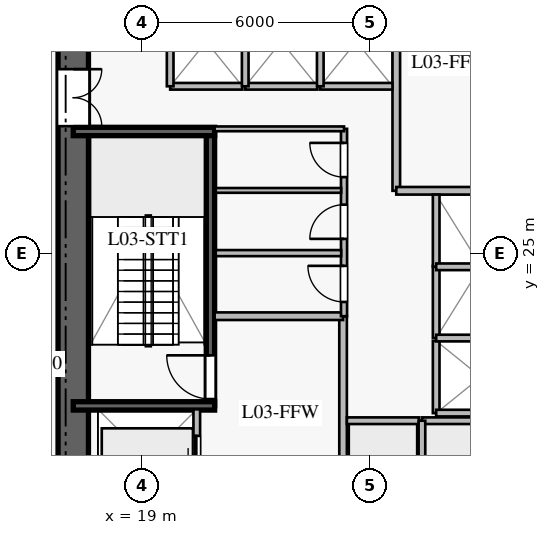
"""IFC4 building model, lengths in metres.
Left out: names, types, materials, properties, quantities, classifications, styles, units other than length and angle.
Written with IfcOpenShell. Run it as: python <this file> out.ifc"""

import sys

from ifc_helpers import new_model, si_unit, direction, frame, frame_2d, origin, place, context, subcontext, project, spatial, rectangle, extrude, element, fill, save


model = new_model("IFC4")
c1 = context("Model", 3, precision=1e-05, world=origin(), true_north=direction((0.0, 1.0)))
c2 = subcontext(c1, "Body", "Model", "MODEL_VIEW")
j1 = project(units=[si_unit("LENGTHUNIT", "METRE"), si_unit("PLANEANGLEUNIT", "RADIAN")], contexts=[c1])
p1 = place(None, origin())
s1 = spatial("IfcSite", under=j1, at=p1, CompositionType="ELEMENT")
p2 = place(p1, origin())
s2 = spatial("IfcBuilding", under=s1, at=p2, CompositionType="ELEMENT")
p3 = place(p2, frame((0.0, 0.0, 14.4)))
s3 = spatial("IfcBuildingStorey", under=s2, at=p3, CompositionType="ELEMENT", Elevation=14.4)
p4 = place(p3, frame((17.2, 31.8, 0.0), z_axis=(0.0, 0.0, 1.0), x_axis=(0.0, -1.0, 0.0)))
e1 = element("IfcWall", 1, at=p4, inside=s3, PredefinedType="SHEAR", context=c2, shape_type="SweptSolid", body=[
    extrude(rectangle(XDim=13.6, YDim=0.8, at=frame_2d((6.8, 0.0))), origin(), (0.0, 0.0, 1.0), 4.3),
])
p5 = place(p4, frame((1.95, 0.0, 0.0)))
e2 = element("IfcOpeningElement", 2, at=p5, cuts=e1, PredefinedType="OPENING", context=c2, shape_type="SweptSolid", body=[
    extrude(rectangle(XDim=1.5, YDim=2.2, at=frame_2d((0.75, 1.1))), frame((0.0, 0.41, 0.0), z_axis=(0.0, -1.0, 0.0), x_axis=(1.0, 0.0, 0.0)), (0.0, 0.0, 1.0), 0.82),
])
p6 = place(p3, frame((20.81, 20.99, 0.0), z_axis=(0.0, 0.0, 1.0), x_axis=(0.0, 1.0, 0.0)))
e3 = element("IfcWall", 3, at=p6, inside=s3, PredefinedType="SOLIDWALL", context=c2, shape_type="SweptSolid", body=[
    extrude(rectangle(XDim=7.22, YDim=0.22, at=frame_2d((3.61, 0.0))), origin(), (0.0, 0.0, 1.0), 4.3),
])
p7 = place(p6, frame((0.18, 0.0, 0.0)))
e4 = element("IfcOpeningElement", 4, at=p7, cuts=e3, PredefinedType="OPENING", context=c2, shape_type="SweptSolid", body=[
    extrude(rectangle(XDim=1.15, YDim=2.2, at=frame_2d((0.575, 1.1))), frame((0.0, 0.12, 0.0), z_axis=(0.0, -1.0, 0.0), x_axis=(1.0, 0.0, 0.0)), (0.0, 0.0, 1.0), 0.24),
])
for number, where, z_axis, x_axis in (
    (5, (17.2, 20.99, 0.0), (0.0, 0.0, 1.0), (1.0, 0.0, 0.0)),
    (6, (17.2, 28.21, 0.0), (0.0, 0.0, 1.0), (1.0, 0.0, 0.0)),
):
    element("IfcWall", number, at=place(p3, frame(where, z_axis=z_axis, x_axis=x_axis)), inside=s3, PredefinedType="SOLIDWALL", context=c2, shape_type="SweptSolid", body=[
        extrude(rectangle(XDim=3.72, YDim=0.22, at=frame_2d((1.86, 0.0))), origin(), (0.0, 0.0, 1.0), 4.3),
    ])
p8 = place(p3, frame((24.3, 18.2, 0.0), z_axis=(0.0, 0.0, 1.0), x_axis=(0.0, 1.0, 0.0)))
e7 = element("IfcWall", 7, at=p8, inside=s3, PredefinedType="PARTITIONING", context=c2, shape_type="SweptSolid", body=[
    extrude(rectangle(XDim=5.15, YDim=0.2, at=frame_2d((2.575, 0.0))), origin(), (0.0, 0.0, 1.0), 4.3),
])
p9 = place(p3, frame((20.92, 23.35, 0.0), z_axis=(0.0, 0.0, 1.0), x_axis=(1.0, 0.0, 0.0)))
e8 = element("IfcWall", 8, at=p9, inside=s3, PredefinedType="PARTITIONING", context=c2, shape_type="SweptSolid", body=[
    extrude(rectangle(XDim=3.38, YDim=0.2, at=frame_2d((1.69, 0.0))), origin(), (0.0, 0.0, 1.0), 4.3),
])
p10 = place(p3, frame((25.7, 26.65, 0.0), z_axis=(0.0, 0.0, 1.0), x_axis=(0.0, 1.0, 0.0)))
e9 = element("IfcWall", 9, at=p10, inside=s3, PredefinedType="PARTITIONING", context=c2, shape_type="SweptSolid", body=[
    extrude(rectangle(XDim=5.15, YDim=0.2, at=frame_2d((2.575, 0.0))), origin(), (0.0, 0.0, 1.0), 4.3),
])
p11 = place(p3, frame((25.7, 26.65, 0.0), z_axis=(0.0, 0.0, 1.0), x_axis=(1.0, 0.0, 0.0)))
e10 = element("IfcWall", 10, at=p11, inside=s3, PredefinedType="PARTITIONING", context=c2, shape_type="SweptSolid", body=[
    extrude(rectangle(XDim=3.38, YDim=0.2, at=frame_2d((1.69, 0.0))), origin(), (0.0, 0.0, 1.0), 4.3),
])
p12 = place(p3, frame((24.325, 23.35, 0.0), z_axis=(0.0, 0.0, 1.0), x_axis=(0.0, 1.0, 0.0)))
e11 = element("IfcWall", 11, at=p12, inside=s3, PredefinedType="PLUMBINGWALL", context=c2, shape_type="SweptSolid", body=[
    extrude(rectangle(XDim=4.93, YDim=0.16, at=frame_2d((2.465, 0.0))), origin(), (0.0, 0.0, 1.0), 4.3),
])
p13 = place(p12, frame((0.375, 0.0, 0.0)))
e12 = element("IfcOpeningElement", 12, at=p13, cuts=e11, PredefinedType="OPENING", context=c2, shape_type="SweptSolid", body=[
    extrude(rectangle(XDim=0.95, YDim=2.1, at=frame_2d((0.475, 1.05))), frame((0.0, 0.09, 0.0), z_axis=(0.0, -1.0, 0.0), x_axis=(1.0, 0.0, 0.0)), (0.0, 0.0, 1.0), 0.18),
])
p14 = place(p12, frame((2.035, 0.0, 0.0)))
e13 = element("IfcOpeningElement", 13, at=p14, cuts=e11, PredefinedType="OPENING", context=c2, shape_type="SweptSolid", body=[
    extrude(rectangle(XDim=0.9, YDim=2.1, at=frame_2d((0.45, 1.05))), frame((0.0, 0.09, 0.0), z_axis=(0.0, -1.0, 0.0), x_axis=(1.0, 0.0, 0.0)), (0.0, 0.0, 1.0), 0.18),
])
p15 = place(p12, frame((3.66, 0.0, 0.0)))
e14 = element("IfcOpeningElement", 14, at=p15, cuts=e11, PredefinedType="OPENING", context=c2, shape_type="SweptSolid", body=[
    extrude(rectangle(XDim=0.9, YDim=2.1, at=frame_2d((0.45, 1.05))), frame((0.0, 0.09, 0.0), z_axis=(0.0, -1.0, 0.0), x_axis=(1.0, 0.0, 0.0)), (0.0, 0.0, 1.0), 0.18),
])
p16 = place(p3, frame((20.92, 28.28, 0.0), z_axis=(0.0, 0.0, 1.0), x_axis=(1.0, 0.0, 0.0)))
e15 = element("IfcWall", 15, at=p16, inside=s3, PredefinedType="PARTITIONING", context=c2, shape_type="SweptSolid", body=[
    extrude(rectangle(XDim=3.405, YDim=0.125, at=frame_2d((1.703, 0.0))), origin(), (0.0, 0.0, 1.0), 4.3),
])
p17 = place(p3, frame((20.95, 25.01, 0.0), z_axis=(0.0, 0.0, 1.0), x_axis=(1.0, 0.0, 0.0)))
e16 = element("IfcWall", 16, at=p17, inside=s3, PredefinedType="PLUMBINGWALL", context=c2, shape_type="SweptSolid", body=[
    extrude(rectangle(XDim=3.3, YDim=0.16, at=frame_2d((1.65, 0.0))), origin(), (0.0, 0.0, 1.0), 4.3),
])
p18 = place(p3, frame((20.95, 26.66, 0.0), z_axis=(0.0, 0.0, 1.0), x_axis=(1.0, 0.0, 0.0)))
e17 = element("IfcWall", 17, at=p18, inside=s3, PredefinedType="PARTITIONING", context=c2, shape_type="SweptSolid", body=[
    extrude(rectangle(XDim=3.3, YDim=0.125, at=frame_2d((1.65, 0.0))), origin(), (0.0, 0.0, 1.0), 4.3),
])
p19 = place(p3, frame((24.4, 20.6, 0.0), z_axis=(0.0, 0.0, 1.0), x_axis=(1.0, 0.0, 0.0)))
e18 = element("IfcWall", 18, at=p19, inside=s3, PredefinedType="PARTITIONING", context=c2, shape_type="SweptSolid", body=[
    extrude(rectangle(XDim=1.9, YDim=0.175, at=frame_2d((0.95, 0.0))), origin(), (0.0, 0.0, 1.0), 4.3),
])
p20 = place(p3, frame((26.375, 20.6, 0.0), z_axis=(0.0, 0.0, 1.0), x_axis=(1.0, 0.0, 0.0)))
e19 = element("IfcWall", 19, at=p20, inside=s3, PredefinedType="PARTITIONING", context=c2, shape_type="SweptSolid", body=[
    extrude(rectangle(XDim=1.9, YDim=0.175, at=frame_2d((0.95, 0.0))), origin(), (0.0, 0.0, 1.0), 4.3),
])
p21 = place(p3, frame((26.375, 18.25, 0.0), z_axis=(0.0, 0.0, 1.0), x_axis=(0.0, 1.0, 0.0)))
e20 = element("IfcWall", 20, at=p21, inside=s3, PredefinedType="PARTITIONING", context=c2, shape_type="SweptSolid", body=[
    extrude(rectangle(XDim=2.35, YDim=0.175, at=frame_2d((1.175, 0.0))), origin(), (0.0, 0.0, 1.0), 4.3),
])
p22 = place(p3, frame((19.75, 29.4, 0.0), z_axis=(0.0, 0.0, 1.0), x_axis=(1.0, 0.0, 0.0)))
e21 = element("IfcWall", 21, at=p22, inside=s3, PredefinedType="PARTITIONING", context=c2, shape_type="SweptSolid", body=[
    extrude(rectangle(XDim=1.9, YDim=0.175, at=frame_2d((0.95, 0.0))), origin(), (0.0, 0.0, 1.0), 4.3),
])
p23 = place(p3, frame((19.75, 29.4, 0.0), z_axis=(0.0, 0.0, 1.0), x_axis=(0.0, 1.0, 0.0)))
e22 = element("IfcWall", 22, at=p23, inside=s3, PredefinedType="PARTITIONING", context=c2, shape_type="SweptSolid", body=[
    extrude(rectangle(XDim=2.35, YDim=0.175, at=frame_2d((1.175, 0.0))), origin(), (0.0, 0.0, 1.0), 4.3),
])
p24 = place(p3, frame((21.725, 29.4, 0.0), z_axis=(0.0, 0.0, 1.0), x_axis=(1.0, 0.0, 0.0)))
e23 = element("IfcWall", 23, at=p24, inside=s3, PredefinedType="PARTITIONING", context=c2, shape_type="SweptSolid", body=[
    extrude(rectangle(XDim=1.9, YDim=0.175, at=frame_2d((0.95, 0.0))), origin(), (0.0, 0.0, 1.0), 4.3),
])
p25 = place(p3, frame((21.725, 29.4, 0.0), z_axis=(0.0, 0.0, 1.0), x_axis=(0.0, 1.0, 0.0)))
e24 = element("IfcWall", 24, at=p25, inside=s3, PredefinedType="PARTITIONING", context=c2, shape_type="SweptSolid", body=[
    extrude(rectangle(XDim=2.35, YDim=0.175, at=frame_2d((1.175, 0.0))), origin(), (0.0, 0.0, 1.0), 4.3),
])
p26 = place(p3, frame((23.7, 29.4, 0.0), z_axis=(0.0, 0.0, 1.0), x_axis=(1.0, 0.0, 0.0)))
e25 = element("IfcWall", 25, at=p26, inside=s3, PredefinedType="PARTITIONING", context=c2, shape_type="SweptSolid", body=[
    extrude(rectangle(XDim=1.9, YDim=0.175, at=frame_2d((0.95, 0.0))), origin(), (0.0, 0.0, 1.0), 4.3),
])
p27 = place(p3, frame((23.7, 29.4, 0.0), z_axis=(0.0, 0.0, 1.0), x_axis=(0.0, 1.0, 0.0)))
e26 = element("IfcWall", 26, at=p27, inside=s3, PredefinedType="PARTITIONING", context=c2, shape_type="SweptSolid", body=[
    extrude(rectangle(XDim=2.35, YDim=0.175, at=frame_2d((1.175, 0.0))), origin(), (0.0, 0.0, 1.0), 4.3),
])
p28 = place(p3, frame((26.75, 20.8, 0.0), z_axis=(0.0, 0.0, 1.0), x_axis=(0.0, 1.0, 0.0)))
e27 = element("IfcWall", 27, at=p28, inside=s3, PredefinedType="PARTITIONING", context=c2, shape_type="SweptSolid", body=[
    extrude(rectangle(XDim=1.9, YDim=0.175, at=frame_2d((0.95, 0.0))), origin(), (0.0, 0.0, 1.0), 4.3),
])
p29 = place(p3, frame((26.75, 20.8, 0.0), z_axis=(0.0, 0.0, 1.0), x_axis=(1.0, 0.0, 0.0)))
e28 = element("IfcWall", 28, at=p29, inside=s3, PredefinedType="PARTITIONING", context=c2, shape_type="SweptSolid", body=[
    extrude(rectangle(XDim=2.35, YDim=0.175, at=frame_2d((1.175, 0.0))), origin(), (0.0, 0.0, 1.0), 4.3),
])
p30 = place(p3, frame((26.75, 22.775, 0.0), z_axis=(0.0, 0.0, 1.0), x_axis=(0.0, 1.0, 0.0)))
e29 = element("IfcWall", 29, at=p30, inside=s3, PredefinedType="PARTITIONING", context=c2, shape_type="SweptSolid", body=[
    extrude(rectangle(XDim=1.9, YDim=0.175, at=frame_2d((0.95, 0.0))), origin(), (0.0, 0.0, 1.0), 4.3),
])
p31 = place(p3, frame((26.75, 22.775, 0.0), z_axis=(0.0, 0.0, 1.0), x_axis=(1.0, 0.0, 0.0)))
e30 = element("IfcWall", 30, at=p31, inside=s3, PredefinedType="PARTITIONING", context=c2, shape_type="SweptSolid", body=[
    extrude(rectangle(XDim=2.35, YDim=0.175, at=frame_2d((1.175, 0.0))), origin(), (0.0, 0.0, 1.0), 4.3),
])
p32 = place(p3, frame((26.75, 24.65, 0.0), z_axis=(0.0, 0.0, 1.0), x_axis=(0.0, 1.0, 0.0)))
e31 = element("IfcWall", 31, at=p32, inside=s3, PredefinedType="PARTITIONING", context=c2, shape_type="SweptSolid", body=[
    extrude(rectangle(XDim=1.9, YDim=0.175, at=frame_2d((0.95, 0.0))), origin(), (0.0, 0.0, 1.0), 4.3),
])
p33 = place(p3, frame((26.75, 24.65, 0.0), z_axis=(0.0, 0.0, 1.0), x_axis=(1.0, 0.0, 0.0)))
e32 = element("IfcWall", 32, at=p33, inside=s3, PredefinedType="PARTITIONING", context=c2, shape_type="SweptSolid", body=[
    extrude(rectangle(XDim=2.35, YDim=0.175, at=frame_2d((1.175, 0.0))), origin(), (0.0, 0.0, 1.0), 4.3),
])
p34 = place(p3, frame((20.45, 18.3, 0.0), z_axis=(0.0, 0.0, 1.0), x_axis=(0.0, 1.0, 0.0)))
e33 = element("IfcWall", 33, at=p34, inside=s3, PredefinedType="PARTITIONING", context=c2, shape_type="SweptSolid", body=[
    extrude(rectangle(XDim=2.6, YDim=0.175, at=frame_2d((1.3, 0.0))), origin(), (0.0, 0.0, 1.0), 4.3),
])
p35 = place(p34, frame((0.7, 0.0, 0.0)))
e34 = element("IfcOpeningElement", 34, at=p35, cuts=e33, PredefinedType="OPENING", context=c2, shape_type="SweptSolid", body=[
    extrude(rectangle(XDim=1.2, YDim=2.2, at=frame_2d((0.6, 1.1))), frame((0.0, 0.098, 0.0), z_axis=(0.0, -1.0, 0.0), x_axis=(1.0, 0.0, 0.0)), (0.0, 0.0, 1.0), 0.195),
])
p36 = place(p7, origin())
e35 = element("IfcDoor", 35, at=p36, inside=s3, OperationType="SINGLE_SWING_RIGHT", PredefinedType="DOOR", context=c2, shape_type="SweptSolid", body=[
    extrude(rectangle(XDim=1.15, YDim=2.2, at=frame_2d((0.575, 1.1))), frame((0.0, 0.025, 0.0), z_axis=(0.0, -1.0, 0.0), x_axis=(1.0, 0.0, 0.0)), (0.0, 0.0, 1.0), 0.05),
])
fill(e4, e35)
p37 = place(p5, origin())
e36 = element("IfcDoor", 36, at=p37, inside=s3, OperationType="DOUBLE_DOOR_SINGLE_SWING", PredefinedType="DOOR", context=c2, shape_type="SweptSolid", body=[
    extrude(rectangle(XDim=1.5, YDim=2.2, at=frame_2d((0.75, 1.1))), frame((0.0, 0.025, 0.0), z_axis=(0.0, -1.0, 0.0), x_axis=(1.0, 0.0, 0.0)), (0.0, 0.0, 1.0), 0.05),
])
fill(e2, e36)
p38 = place(p13, origin())
e37 = element("IfcDoor", 37, at=p38, inside=s3, OperationType="SINGLE_SWING_RIGHT", PredefinedType="DOOR", context=c2, shape_type="SweptSolid", body=[
    extrude(rectangle(XDim=0.95, YDim=2.1, at=frame_2d((0.475, 1.05))), frame((0.0, 0.025, 0.0), z_axis=(0.0, -1.0, 0.0), x_axis=(1.0, 0.0, 0.0)), (0.0, 0.0, 1.0), 0.05),
])
fill(e12, e37)
p39 = place(p14, origin())
e38 = element("IfcDoor", 38, at=p39, inside=s3, OperationType="SINGLE_SWING_LEFT", PredefinedType="DOOR", context=c2, shape_type="SweptSolid", body=[
    extrude(rectangle(XDim=0.9, YDim=2.1, at=frame_2d((0.45, 1.05))), frame((0.0, 0.025, 0.0), z_axis=(0.0, -1.0, 0.0), x_axis=(1.0, 0.0, 0.0)), (0.0, 0.0, 1.0), 0.05),
])
fill(e13, e38)
p40 = place(p15, origin())
e39 = element("IfcDoor", 39, at=p40, inside=s3, OperationType="SINGLE_SWING_RIGHT", PredefinedType="DOOR", context=c2, shape_type="SweptSolid", body=[
    extrude(rectangle(XDim=0.9, YDim=2.1, at=frame_2d((0.45, 1.05))), frame((0.0, 0.025, 0.0), z_axis=(0.0, -1.0, 0.0), x_axis=(1.0, 0.0, 0.0)), (0.0, 0.0, 1.0), 0.05),
])
fill(e14, e39)
p41 = place(p35, origin())
e40 = element("IfcDoor", 40, at=p41, inside=s3, OperationType="DOUBLE_DOOR_SLIDING", PredefinedType="DOOR", context=c2, shape_type="SweptSolid", body=[
    extrude(rectangle(XDim=1.2, YDim=2.2, at=frame_2d((0.6, 1.1))), frame((0.0, 0.025, 0.0), z_axis=(0.0, -1.0, 0.0), x_axis=(1.0, 0.0, 0.0)), (0.0, 0.0, 1.0), 0.05),
])
fill(e34, e40)
save(model, sys.argv[1])
